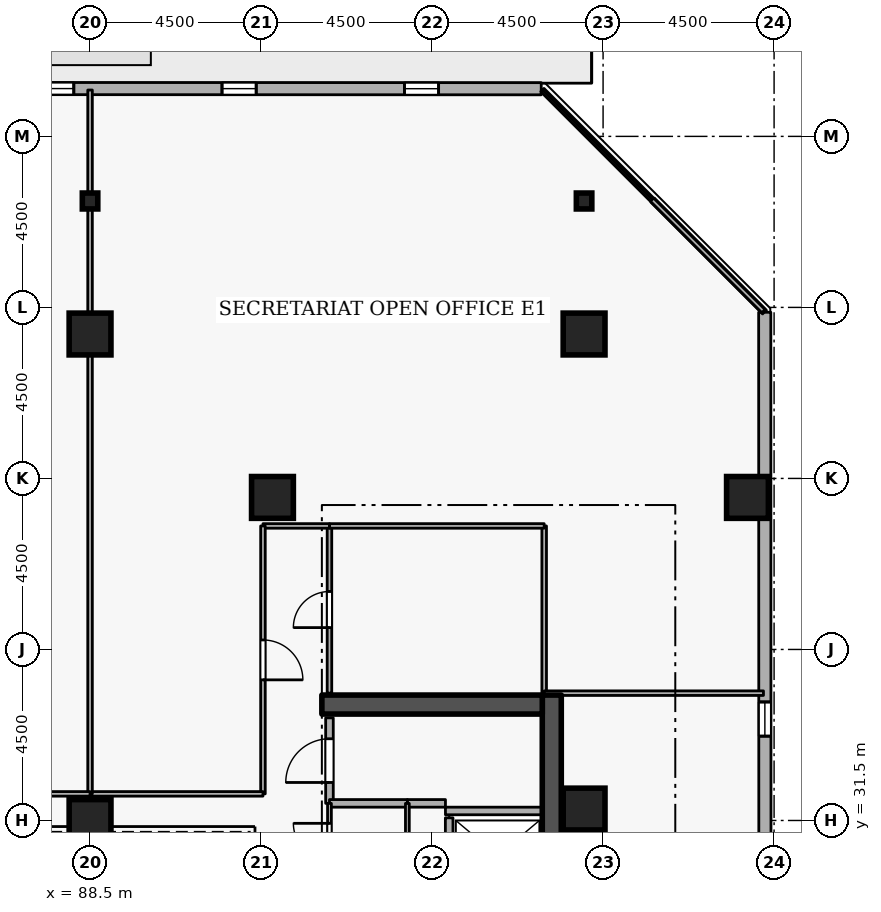
"""IFC4 building model, lengths in metres.
Left out: names, types, materials, properties, quantities, classifications, styles, units other than length and angle.
Written with IfcOpenShell. Run it as: python <this file> out.ifc"""

import sys

from ifc_helpers import new_model, si_unit, direction, frame, frame_2d, origin, origin_2d, place, context, subcontext, project, spatial, rectangle, i_section, extrude, element, fill, save


model = new_model("IFC4")
c1 = context("Model", 3, precision=1e-05, world=origin(), true_north=direction((0.0, 1.0)))
c2 = subcontext(c1, "Body", "Model", "MODEL_VIEW")
j1 = project(units=[si_unit("LENGTHUNIT", "METRE"), si_unit("PLANEANGLEUNIT", "RADIAN")], contexts=[c1])
p1 = place(None, origin())
s1 = spatial("IfcSite", under=j1, at=p1, CompositionType="ELEMENT")
p2 = place(p1, origin())
s2 = spatial("IfcBuilding", under=s1, at=p2, CompositionType="ELEMENT")
p3 = place(p2, frame((0.0, 0.0, 178.5)))
s3 = spatial("IfcBuildingStorey", under=s2, at=p3, CompositionType="ELEMENT", Elevation=178.5)
p4 = place(p3, frame((100.65, 19.2, 0.0), z_axis=(0.0, 0.0, 1.0), x_axis=(0.0, 1.0, 0.0)))
e1 = element("IfcWall", 1, at=p4, inside=s3, PredefinedType="SHEAR", context=c2, shape_type="SweptSolid", body=[
    extrude(rectangle(XDim=15.6, YDim=0.5, at=frame_2d((7.8, 0.0))), origin(), (0.0, 0.0, 1.0), 3.6),
])
p5 = place(p3, frame((94.6, 34.55, 0.0), z_axis=(0.0, 0.0, 1.0), x_axis=(1.0, 0.0, 0.0)))
e2 = element("IfcWall", 2, at=p5, inside=s3, PredefinedType="SHEAR", context=c2, shape_type="SweptSolid", body=[
    extrude(rectangle(XDim=5.8, YDim=0.5, at=frame_2d((2.9, 0.0))), origin(), (0.0, 0.0, 1.0), 3.6),
])
for number, where, z_axis, x_axis in (
    (3, (105.8, 40.0, 0.0), (0.0, 0.0, 1.0), (1.0, 0.0, 0.0)),
    (4, (101.5, 44.3, 0.0), (0.0, 0.0, 1.0), (1.0, 0.0, 0.0)),
    (5, (88.5, 44.3, 0.0), (0.0, 0.0, 1.0), (1.0, 0.0, 0.0)),
    (6, (93.3, 40.0, 0.0), (0.0, 0.0, 1.0), (1.0, 0.0, 0.0)),
    (7, (101.5, 31.8, 0.0), (0.0, 0.0, 1.0), (1.0, 0.0, 0.0)),
    (8, (88.5, 31.5, 0.0), (0.0, 0.0, 1.0), (1.0, 0.0, 0.0)),
):
    element("IfcColumn", number, at=place(p3, frame(where, z_axis=z_axis, x_axis=x_axis)), inside=s3, PredefinedType="COLUMN", context=c2, shape_type="SweptSolid", body=[
        extrude(rectangle(XDim=1.1, YDim=1.1, at=origin_2d()), origin(), (0.0, 0.0, 1.0), 3.6),
    ])
for number, where, z_axis, x_axis in (
    (9, (101.5, 47.8, 0.0), (0.0, 0.0, 1.0), (1.0, 0.0, 0.0)),
    (10, (88.5, 47.8, 0.0), (0.0, 0.0, 1.0), (1.0, 0.0, 0.0)),
):
    element("IfcColumn", number, at=place(p3, frame(where, z_axis=z_axis, x_axis=x_axis)), inside=s3, PredefinedType="COLUMN", context=c2, shape_type="SweptSolid", body=[
        extrude(i_section(OverallWidth=0.407, OverallDepth=0.419, WebThickness=0.031, FlangeThickness=0.049, FilletRadius=0.015, at=origin_2d()), origin(), (0.0, 0.0, 1.0), 3.6),
    ])
p6 = place(p3, frame((106.265, 11.819, 0.0), z_axis=(0.0, 0.0, 1.0), x_axis=(-0.000332378036, 0.999999944762, 0.0)))
e11 = element("IfcWall", 11, at=p6, inside=s3, PredefinedType="STANDARD", context=c2, shape_type="SweptSolid", body=[
    extrude(rectangle(XDim=33.054, YDim=0.32, at=frame_2d((16.527, 0.0))), origin(), (0.0, 0.0, 1.0), 2.7),
])
p7 = place(p6, frame((7.5, 0.0, 0.72)))
e12 = element("IfcOpeningElement", 12, at=p7, cuts=e11, PredefinedType="OPENING", context=c2, shape_type="SweptSolid", body=[
    extrude(rectangle(XDim=0.9, YDim=1.75, at=frame_2d((0.45, 0.875))), frame((0.0, 0.17, 0.0), z_axis=(0.0, -1.0, 0.0), x_axis=(1.0, 0.0, 0.0)), (0.0, 0.0, 1.0), 0.34),
])
p8 = place(p6, frame((12.3, 0.0, 0.72)))
e13 = element("IfcOpeningElement", 13, at=p8, cuts=e11, PredefinedType="OPENING", context=c2, shape_type="SweptSolid", body=[
    extrude(rectangle(XDim=0.9, YDim=1.75, at=frame_2d((0.45, 0.875))), frame((0.0, 0.17, 0.0), z_axis=(0.0, -1.0, 0.0), x_axis=(1.0, 0.0, 0.0)), (0.0, 0.0, 1.0), 0.34),
])
p9 = place(p6, frame((17.1, 0.0, 0.72)))
e14 = element("IfcOpeningElement", 14, at=p9, cuts=e11, PredefinedType="OPENING", context=c2, shape_type="SweptSolid", body=[
    extrude(rectangle(XDim=0.9, YDim=1.75, at=frame_2d((0.45, 0.875))), frame((0.0, 0.17, 0.0), z_axis=(0.0, -1.0, 0.0), x_axis=(1.0, 0.0, 0.0)), (0.0, 0.0, 1.0), 0.34),
])
p10 = place(p6, frame((21.9, 0.0, 0.72)))
e15 = element("IfcOpeningElement", 15, at=p10, cuts=e11, PredefinedType="OPENING", context=c2, shape_type="SweptSolid", body=[
    extrude(rectangle(XDim=0.9, YDim=1.75, at=frame_2d((0.45, 0.875))), frame((0.0, 0.17, 0.0), z_axis=(0.0, -1.0, 0.0), x_axis=(1.0, 0.0, 0.0)), (0.0, 0.0, 1.0), 0.34),
])
p11 = place(p3, frame((100.372, 50.754, 0.0), z_axis=(0.0, 0.0, 1.0), x_axis=(-0.999999944762, 0.000332378036, 0.0)))
e16 = element("IfcWall", 16, at=p11, inside=s3, PredefinedType="STANDARD", context=c2, shape_type="SweptSolid", body=[
    extrude(rectangle(XDim=33.054, YDim=0.32, at=frame_2d((16.527, 0.0))), origin(), (0.0, 0.0, 1.0), 2.7),
])
p12 = place(p11, frame((18.327, 0.0, 0.0)))
e17 = element("IfcOpeningElement", 17, at=p12, cuts=e16, PredefinedType="OPENING", context=c2, shape_type="SweptSolid", body=[
    extrude(rectangle(XDim=1.0, YDim=2.08, at=frame_2d((0.5, 1.04))), frame((0.0, 0.17, 0.0), z_axis=(0.0, -1.0, 0.0), x_axis=(1.0, 0.0, 0.0)), (0.0, 0.0, 1.0), 0.34),
])
p13 = place(p11, frame((2.7, 0.0, 0.72)))
e18 = element("IfcOpeningElement", 18, at=p13, cuts=e16, PredefinedType="OPENING", context=c2, shape_type="SweptSolid", body=[
    extrude(rectangle(XDim=0.9, YDim=1.75, at=frame_2d((0.45, 0.875))), frame((0.0, 0.17, 0.0), z_axis=(0.0, -1.0, 0.0), x_axis=(1.0, 0.0, 0.0)), (0.0, 0.0, 1.0), 0.34),
])
p14 = place(p11, frame((7.5, 0.0, 0.72)))
e19 = element("IfcOpeningElement", 19, at=p14, cuts=e16, PredefinedType="OPENING", context=c2, shape_type="SweptSolid", body=[
    extrude(rectangle(XDim=0.9, YDim=1.75, at=frame_2d((0.45, 0.875))), frame((0.0, 0.17, 0.0), z_axis=(0.0, -1.0, 0.0), x_axis=(1.0, 0.0, 0.0)), (0.0, 0.0, 1.0), 0.34),
])
p15 = place(p11, frame((12.3, 0.0, 0.72)))
e20 = element("IfcOpeningElement", 20, at=p15, cuts=e16, PredefinedType="OPENING", context=c2, shape_type="SweptSolid", body=[
    extrude(rectangle(XDim=0.9, YDim=1.75, at=frame_2d((0.45, 0.875))), frame((0.0, 0.17, 0.0), z_axis=(0.0, -1.0, 0.0), x_axis=(1.0, 0.0, 0.0)), (0.0, 0.0, 1.0), 0.34),
])
p16 = place(p11, frame((21.9, 0.0, 0.72)))
e21 = element("IfcOpeningElement", 21, at=p16, cuts=e16, PredefinedType="OPENING", context=c2, shape_type="SweptSolid", body=[
    extrude(rectangle(XDim=0.9, YDim=1.75, at=frame_2d((0.45, 0.875))), frame((0.0, 0.17, 0.0), z_axis=(0.0, -1.0, 0.0), x_axis=(1.0, 0.0, 0.0)), (0.0, 0.0, 1.0), 0.34),
])
p17 = place(p11, frame((26.7, 0.0, 0.72)))
e22 = element("IfcOpeningElement", 22, at=p17, cuts=e16, PredefinedType="OPENING", context=c2, shape_type="SweptSolid", body=[
    extrude(rectangle(XDim=0.9, YDim=1.75, at=frame_2d((0.45, 0.875))), frame((0.0, 0.17, 0.0), z_axis=(0.0, -1.0, 0.0), x_axis=(1.0, 0.0, 0.0)), (0.0, 0.0, 1.0), 0.34),
])
p18 = place(p3, frame((97.95, 31.57, 0.0), z_axis=(0.0, 0.0, 1.0), x_axis=(0.0, -1.0, 0.0)))
e23 = element("IfcWall", 23, at=p18, inside=s3, PredefinedType="STANDARD", context=c2, shape_type="SweptSolid", body=[
    extrude(rectangle(XDim=1.99, YDim=0.2, at=frame_2d((0.995, 0.0))), origin(), (0.0, 0.0, 1.0), 3.34),
])
p19 = place(p18, frame((0.485, 0.0, 0.0)))
e24 = element("IfcOpeningElement", 24, at=p19, cuts=e23, PredefinedType="OPENING", context=c2, shape_type="SweptSolid", body=[
    extrude(rectangle(XDim=1.02, YDim=2.06, at=frame_2d((0.51, 1.03))), frame((0.0, 0.11, 0.0), z_axis=(0.0, -1.0, 0.0), x_axis=(1.0, 0.0, 0.0)), (0.0, 0.0, 1.0), 0.22),
])
p20 = place(p3, frame((97.852, 31.75, 0.0), z_axis=(0.0, 0.0, 1.0), x_axis=(1.0, 0.0, 0.0)))
e25 = element("IfcWall", 25, at=p20, inside=s3, PredefinedType="STANDARD", context=c2, shape_type="SweptSolid", body=[
    extrude(rectangle(XDim=2.536, YDim=0.2, at=frame_2d((1.268, 0.0))), origin(), (0.0, 0.0, 1.0), 3.34),
])
p21 = place(p3, frame((94.8, 31.95, 0.0), z_axis=(0.0, 0.0, 1.0), x_axis=(0.0, 1.0, 0.0)))
e26 = element("IfcWall", 26, at=p21, inside=s3, PredefinedType="STANDARD", context=c2, shape_type="SweptSolid", body=[
    extrude(rectangle(XDim=2.25, YDim=0.2, at=frame_2d((1.125, 0.0))), origin(), (0.0, 0.0, 1.0), 3.34),
])
p22 = place(p21, frame((0.55, 0.0, 0.0)))
e27 = element("IfcOpeningElement", 27, at=p22, cuts=e26, PredefinedType="OPENING", context=c2, shape_type="SweptSolid", body=[
    extrude(rectangle(XDim=1.15, YDim=2.1, at=frame_2d((0.575, 1.05))), frame((0.0, 0.11, 0.0), z_axis=(0.0, -1.0, 0.0), x_axis=(1.0, 0.0, 0.0)), (0.0, 0.0, 1.0), 0.22),
])
p23 = place(p3, frame((97.852, 31.95, 0.0), z_axis=(0.0, 0.0, 1.0), x_axis=(-1.0, 0.0, 0.0)))
e28 = element("IfcWall", 28, at=p23, inside=s3, PredefinedType="STANDARD", context=c2, shape_type="SweptSolid", body=[
    extrude(rectangle(XDim=1.002, YDim=0.2, at=frame_2d((0.501, 0.0))), origin(), (0.0, 0.0, 1.0), 3.34),
])
p24 = place(p3, frame((96.85, 31.95, 0.0), z_axis=(0.0, 0.0, 1.0), x_axis=(-1.0, 0.0, 0.0)))
e29 = element("IfcWall", 29, at=p24, inside=s3, PredefinedType="STANDARD", context=c2, shape_type="SweptSolid", body=[
    extrude(rectangle(XDim=2.05, YDim=0.2, at=frame_2d((1.025, 0.0))), origin(), (0.0, 0.0, 1.0), 3.34),
])
p25 = place(p3, frame((94.8, 29.95, 0.0), z_axis=(0.0, 0.0, 1.0), x_axis=(0.0, 1.0, 0.0)))
e30 = element("IfcWall", 30, at=p25, inside=s3, PredefinedType="PARTITIONING", context=c2, shape_type="SweptSolid", body=[
    extrude(rectangle(XDim=2.0, YDim=0.1, at=frame_2d((1.0, 0.0))), origin(), (0.0, 0.0, 1.0), 3.34),
])
p26 = place(p25, frame((0.525, 0.0, 0.0)))
e31 = element("IfcOpeningElement", 31, at=p26, cuts=e30, PredefinedType="OPENING", context=c2, shape_type="SweptSolid", body=[
    extrude(rectangle(XDim=0.95, YDim=2.1, at=frame_2d((0.475, 1.05))), frame((0.0, 0.06, 0.0), z_axis=(0.0, -1.0, 0.0), x_axis=(1.0, 0.0, 0.0)), (0.0, 0.0, 1.0), 0.12),
])
p27 = place(p3, frame((96.85, 31.95, 0.0), z_axis=(0.0, 0.0, 1.0), x_axis=(0.0, -1.0, 0.0)))
e32 = element("IfcWall", 32, at=p27, inside=s3, PredefinedType="PARTITIONING", context=c2, shape_type="SweptSolid", body=[
    extrude(rectangle(XDim=2.0, YDim=0.1, at=frame_2d((1.0, 0.0))), origin(), (0.0, 0.0, 1.0), 3.34),
])
p28 = place(p3, frame((100.45, 39.25, 0.0), z_axis=(0.0, 0.0, 1.0), x_axis=(0.0, -1.0, 0.0)))
e33 = element("IfcWall", 33, at=p28, inside=s3, PredefinedType="PARTITIONING", context=c2, shape_type="SweptSolid", body=[
    extrude(rectangle(XDim=4.4, YDim=0.12, at=frame_2d((2.2, 0.0))), origin(), (0.0, 0.0, 1.0), 3.34),
])
p29 = place(p3, frame((94.8, 34.85, 0.0), z_axis=(0.0, 0.0, 1.0), x_axis=(0.0, 1.0, 0.0)))
e34 = element("IfcWall", 34, at=p29, inside=s3, PredefinedType="PARTITIONING", context=c2, shape_type="SweptSolid", body=[
    extrude(rectangle(XDim=4.4, YDim=0.12, at=frame_2d((2.2, 0.0))), origin(), (0.0, 0.0, 1.0), 3.34),
])
p30 = place(p29, frame((1.725, 0.0, 0.0)))
e35 = element("IfcOpeningElement", 35, at=p30, cuts=e34, PredefinedType="OPENING", context=c2, shape_type="SweptSolid", body=[
    extrude(rectangle(XDim=0.95, YDim=2.1, at=frame_2d((0.475, 1.05))), frame((0.0, 0.07, 0.0), z_axis=(0.0, -1.0, 0.0), x_axis=(1.0, 0.0, 0.0)), (0.0, 0.0, 1.0), 0.14),
])
p31 = place(p3, frame((94.8, 39.25, 0.0), z_axis=(0.0, 0.0, 1.0), x_axis=(1.0, 0.0, 0.0)))
e36 = element("IfcWall", 36, at=p31, inside=s3, PredefinedType="PARTITIONING", context=c2, shape_type="SweptSolid", body=[
    extrude(rectangle(XDim=5.65, YDim=0.12, at=frame_2d((2.825, 0.0))), origin(), (0.0, 0.0, 1.0), 3.34),
])
p32 = place(p3, frame((94.8, 39.25, 0.0), z_axis=(0.0, 0.0, 1.0), x_axis=(-1.0, 0.0, 0.0)))
e37 = element("IfcWall", 37, at=p32, inside=s3, PredefinedType="PARTITIONING", context=c2, shape_type="SweptSolid", body=[
    extrude(rectangle(XDim=1.75, YDim=0.12, at=frame_2d((0.875, 0.0))), origin(), (0.0, 0.0, 1.0), 3.34),
])
p33 = place(p3, frame((93.05, 39.25, 0.0), z_axis=(0.0, 0.0, 1.0), x_axis=(0.0, -1.0, 0.0)))
e38 = element("IfcWall", 38, at=p33, inside=s3, PredefinedType="PARTITIONING", context=c2, shape_type="SweptSolid", body=[
    extrude(rectangle(XDim=7.05, YDim=0.12, at=frame_2d((3.525, 0.0))), origin(), (0.0, 0.0, 1.0), 3.34),
])
p34 = place(p33, frame((3.0, 0.0, 0.0)))
e39 = element("IfcOpeningElement", 39, at=p34, cuts=e38, PredefinedType="OPENING", context=c2, shape_type="SweptSolid", body=[
    extrude(rectangle(XDim=1.05, YDim=2.1, at=frame_2d((0.525, 1.05))), frame((0.0, 0.07, 0.0), z_axis=(0.0, -1.0, 0.0), x_axis=(1.0, 0.0, 0.0)), (0.0, 0.0, 1.0), 0.14),
])
p35 = place(p3, frame((93.05, 32.2, 0.0), z_axis=(0.0, 0.0, 1.0), x_axis=(-1.0, 0.0, 0.0)))
e40 = element("IfcWall", 40, at=p35, inside=s3, PredefinedType="PARTITIONING", context=c2, shape_type="SweptSolid", body=[
    extrude(rectangle(XDim=4.55, YDim=0.12, at=frame_2d((2.275, 0.0))), origin(), (0.0, 0.0, 1.0), 3.34),
])
p36 = place(p3, frame((88.5, 32.2, 0.0), z_axis=(0.0, 0.0, 1.0), x_axis=(0.0, 1.0, 0.0)))
e41 = element("IfcWall", 41, at=p36, inside=s3, PredefinedType="PARTITIONING", context=c2, shape_type="SweptSolid", body=[
    extrude(rectangle(XDim=18.52, YDim=0.12, at=frame_2d((9.26, 0.0))), origin(), (0.0, 0.0, 1.0), 2.932),
])
p37 = place(p3, frame((100.402, 50.72, 0.0), z_axis=(0.0, 0.0, 1.0), x_axis=(0.707106781187, -0.707106781187, 0.0)))
e42 = element("IfcWall", 42, at=p37, inside=s3, PredefinedType="PARTITIONING", context=c2, shape_type="SweptSolid", body=[
    extrude(rectangle(XDim=8.227, YDim=0.12, at=frame_2d((4.114, 0.0))), origin(), (0.0, 0.0, 1.0), 3.34),
])
p38 = place(p3, frame((106.22, 34.85, 0.0), z_axis=(0.0, 0.0, 1.0), x_axis=(-1.0, 0.0, 0.0)))
e43 = element("IfcWall", 43, at=p38, inside=s3, PredefinedType="PARTITIONING", context=c2, shape_type="SweptSolid", body=[
    extrude(rectangle(XDim=5.77, YDim=0.12, at=frame_2d((2.885, 0.0))), origin(), (0.0, 0.0, 1.0), 2.545),
])
p39 = place(p3, frame((88.5, 32.2, 0.0), z_axis=(0.0, 0.0, 1.0), x_axis=(-1.0, 0.0, 0.0)))
e44 = element("IfcWall", 44, at=p39, inside=s3, PredefinedType="PARTITIONING", context=c2, shape_type="SweptSolid", body=[
    extrude(rectangle(XDim=4.55, YDim=0.12, at=frame_2d((2.275, 0.0))), origin(), (0.0, 0.0, 1.0), 3.34),
])
p40 = place(p10, origin())
e45 = element("IfcWindow", 45, at=p40, inside=s3, PartitioningType="SINGLE_PANEL", PredefinedType="WINDOW", context=c2, shape_type="SweptSolid", body=[
    extrude(rectangle(XDim=0.9, YDim=1.75, at=frame_2d((0.45, 0.875))), frame((0.0, 0.03, 0.0), z_axis=(0.0, -1.0, 0.0), x_axis=(1.0, 0.0, 0.0)), (0.0, 0.0, 1.0), 0.06),
])
fill(e15, e45)
p41 = place(p13, origin())
e46 = element("IfcWindow", 46, at=p41, inside=s3, PartitioningType="SINGLE_PANEL", PredefinedType="WINDOW", context=c2, shape_type="SweptSolid", body=[
    extrude(rectangle(XDim=0.9, YDim=1.75, at=frame_2d((0.45, 0.875))), frame((0.0, 0.03, 0.0), z_axis=(0.0, -1.0, 0.0), x_axis=(1.0, 0.0, 0.0)), (0.0, 0.0, 1.0), 0.06),
])
fill(e18, e46)
p42 = place(p14, origin())
e47 = element("IfcWindow", 47, at=p42, inside=s3, PartitioningType="SINGLE_PANEL", PredefinedType="WINDOW", context=c2, shape_type="SweptSolid", body=[
    extrude(rectangle(XDim=0.9, YDim=1.75, at=frame_2d((0.45, 0.875))), frame((0.0, 0.03, 0.0), z_axis=(0.0, -1.0, 0.0), x_axis=(1.0, 0.0, 0.0)), (0.0, 0.0, 1.0), 0.06),
])
fill(e19, e47)
p43 = place(p15, origin())
e48 = element("IfcWindow", 48, at=p43, inside=s3, PartitioningType="SINGLE_PANEL", PredefinedType="WINDOW", context=c2, shape_type="SweptSolid", body=[
    extrude(rectangle(XDim=0.9, YDim=1.75, at=frame_2d((0.45, 0.875))), frame((0.0, 0.03, 0.0), z_axis=(0.0, -1.0, 0.0), x_axis=(1.0, 0.0, 0.0)), (0.0, 0.0, 1.0), 0.06),
])
fill(e20, e48)
p44 = place(p26, origin())
e49 = element("IfcDoor", 49, at=p44, inside=s3, OperationType="SINGLE_SWING_RIGHT", PredefinedType="DOOR", context=c2, shape_type="SweptSolid", body=[
    extrude(rectangle(XDim=0.95, YDim=2.1, at=frame_2d((0.475, 1.05))), frame((0.0, 0.025, 0.0), z_axis=(0.0, -1.0, 0.0), x_axis=(1.0, 0.0, 0.0)), (0.0, 0.0, 1.0), 0.05),
])
fill(e31, e49)
p45 = place(p22, origin())
e50 = element("IfcDoor", 50, at=p45, inside=s3, OperationType="SINGLE_SWING_LEFT", PredefinedType="DOOR", context=c2, shape_type="SweptSolid", body=[
    extrude(rectangle(XDim=1.15, YDim=2.1, at=frame_2d((0.575, 1.05))), frame((0.0, 0.025, 0.0), z_axis=(0.0, -1.0, 0.0), x_axis=(1.0, 0.0, 0.0)), (0.0, 0.0, 1.0), 0.05),
])
fill(e27, e50)
p46 = place(p30, origin())
e51 = element("IfcDoor", 51, at=p46, inside=s3, OperationType="SINGLE_SWING_LEFT", PredefinedType="DOOR", context=c2, shape_type="SweptSolid", body=[
    extrude(rectangle(XDim=0.95, YDim=2.1, at=frame_2d((0.475, 1.05))), frame((0.0, 0.025, 0.0), z_axis=(0.0, -1.0, 0.0), x_axis=(1.0, 0.0, 0.0)), (0.0, 0.0, 1.0), 0.05),
])
fill(e35, e51)
p47 = place(p34, origin())
e52 = element("IfcDoor", 52, at=p47, inside=s3, OperationType="SINGLE_SWING_RIGHT", PredefinedType="DOOR", context=c2, shape_type="SweptSolid", body=[
    extrude(rectangle(XDim=1.05, YDim=2.1, at=frame_2d((0.525, 1.05))), frame((0.0, 0.025, 0.0), z_axis=(0.0, -1.0, 0.0), x_axis=(1.0, 0.0, 0.0)), (0.0, 0.0, 1.0), 0.05),
])
fill(e39, e52)
save(model, sys.argv[1])
